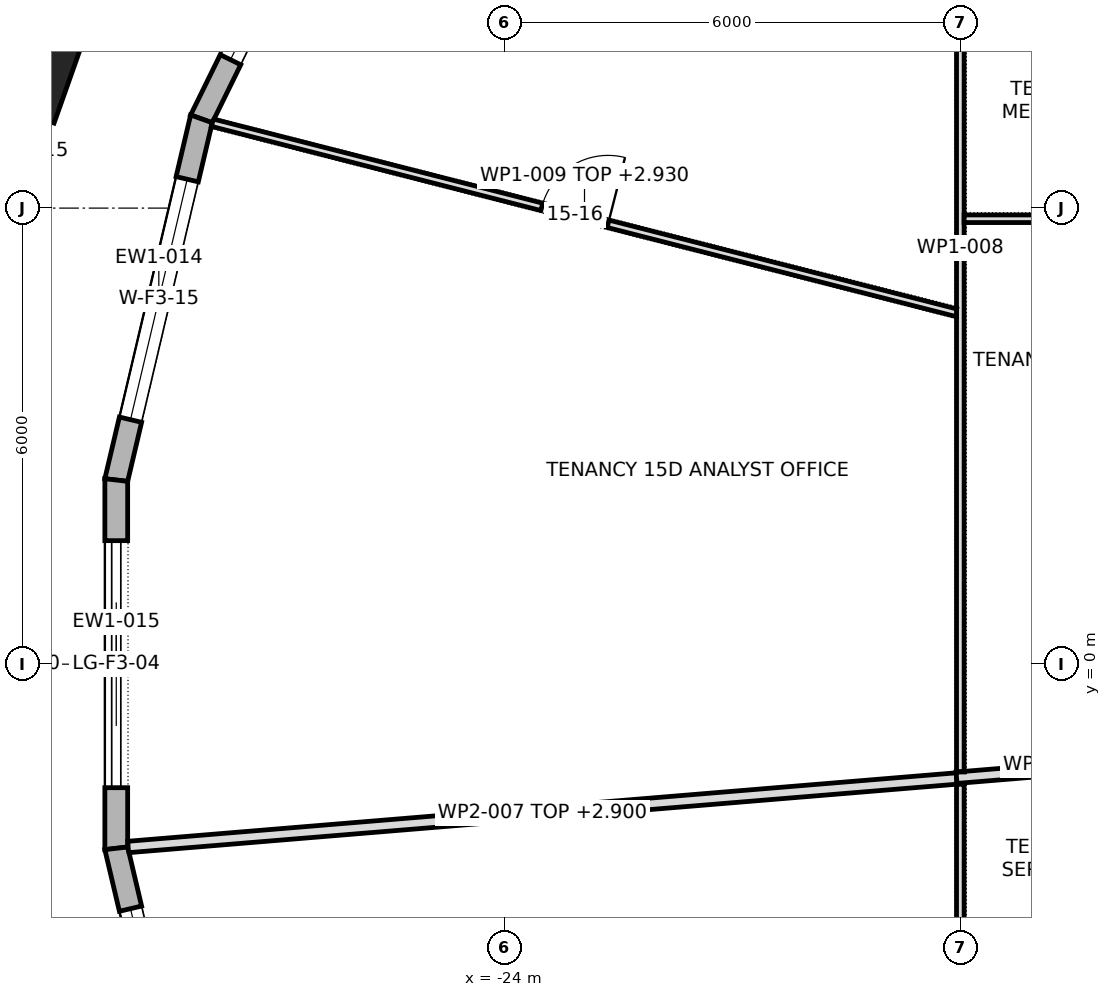
"""IFC4 building model, lengths in metres.
Left out: names, types, materials, properties, quantities, classifications, styles, units other than length and angle.
Written with IfcOpenShell. Run it as: python <this file> out.ifc"""

import sys

from ifc_helpers import new_model, si_unit, direction, frame, frame_2d, origin, origin_2d, place, context, subcontext, project, spatial, polyline, rectangle, outline, extrude, element, fill, save


model = new_model("IFC4")
c1 = context("Model", 3, precision=1e-05, world=origin(), true_north=direction((0.0, 1.0)))
c2 = subcontext(c1, "Body", "Model", "MODEL_VIEW")
j1 = project(units=[si_unit("LENGTHUNIT", "METRE"), si_unit("PLANEANGLEUNIT", "RADIAN")], contexts=[c1])
p1 = place(None, origin())
s1 = spatial("IfcSite", under=j1, at=p1, CompositionType="ELEMENT")
p2 = place(p1, origin())
s2 = spatial("IfcBuilding", under=s1, at=p2, CompositionType="ELEMENT")
p3 = place(p2, frame((0.0, 0.0, 222.9)))
s3 = spatial("IfcBuildingStorey", under=s2, at=p3, CompositionType="ELEMENT", Elevation=222.9)
p4 = place(p3, frame((-30.194, 7.851, 0.0), z_axis=(0.0, 0.0, 1.0), x_axis=(-0.333630814899, -0.942703813162, 0.0)))
e1 = element("IfcColumn", 1, at=p4, inside=s3, PredefinedType="COLUMN", context=c2, shape_type="SweptSolid", body=[
    extrude(rectangle(XDim=1.2, YDim=1.0, at=origin_2d()), origin(), (0.0, 0.0, 1.0), 4.0),
])
p5 = place(p3, frame((-25.787, 11.648, 0.0), z_axis=(0.0, 0.0, 1.0), x_axis=(-0.440795186599, -0.897607711348, 0.0)))
e2 = element("IfcWall", 2, at=p5, inside=s3, PredefinedType="STANDARD", context=c2, shape_type="SweptSolid", body=[
    extrude(outline(polyline([(-0.016, -0.15), (5.001, -0.15), (4.967, 0.15), (0.016, 0.15), (-0.016, -0.15)])), origin(), (0.0, 0.0, 1.0), 3.7),
])
p6 = place(p5, frame((0.867, 0.0, 0.6)))
e3 = element("IfcOpeningElement", 3, at=p6, cuts=e2, PredefinedType="OPENING", context=c2, shape_type="SweptSolid", body=[
    extrude(rectangle(XDim=3.25, YDim=2.65, at=frame_2d((1.625, 1.325))), frame((0.0, 0.162, 0.0), z_axis=(0.0, -1.0, 0.0), x_axis=(1.0, 0.0, 0.0)), (0.0, 0.0, 1.0), 0.324),
])
p7 = place(p3, frame((-27.984, 7.174, 0.0), z_axis=(0.0, 0.0, 1.0), x_axis=(-0.229546618766, -0.97329766763, 0.0)))
e4 = element("IfcWall", 4, at=p7, inside=s3, PredefinedType="STANDARD", context=c2, shape_type="SweptSolid", body=[
    extrude(outline(polyline([(-0.017, -0.15), (4.899, -0.15), (4.865, 0.15), (0.017, 0.15), (-0.017, -0.15)])), origin(), (0.0, 0.0, 1.0), 3.7),
])
p8 = place(p7, frame((0.816, 0.0, 0.6)))
e5 = element("IfcOpeningElement", 5, at=p8, cuts=e4, PredefinedType="OPENING", context=c2, shape_type="SweptSolid", body=[
    extrude(rectangle(XDim=3.25, YDim=2.65, at=frame_2d((1.625, 1.325))), frame((0.0, 0.162, 0.0), z_axis=(0.0, -1.0, 0.0), x_axis=(1.0, 0.0, 0.0)), (0.0, 0.0, 1.0), 0.324),
])
p9 = place(p3, frame((-29.104, 2.423, 0.0), z_axis=(0.0, 0.0, 1.0), x_axis=(0.0, -1.0, 0.0)))
e6 = element("IfcWall", 6, at=p9, inside=s3, PredefinedType="STANDARD", context=c2, shape_type="SweptSolid", body=[
    extrude(outline(polyline([(-0.017, -0.15), (4.863, -0.15), (4.828, 0.15), (0.017, 0.15), (-0.017, -0.15)])), origin(), (0.0, 0.0, 1.0), 3.7),
])
p10 = place(p9, frame((0.798, 0.0, 0.0)))
e7 = element("IfcOpeningElement", 7, at=p10, cuts=e6, PredefinedType="OPENING", context=c2, shape_type="SweptSolid", body=[
    extrude(rectangle(XDim=3.25, YDim=3.25, at=frame_2d((1.625, 1.625))), frame((0.0, 0.162, 0.0), z_axis=(0.0, -1.0, 0.0), x_axis=(1.0, 0.0, 0.0)), (0.0, 0.0, 1.0), 0.324),
])
p11 = place(p3, frame((-29.104, -2.423, 0.0), z_axis=(0.0, 0.0, 1.0), x_axis=(0.229546618766, -0.97329766763, 0.0)))
e8 = element("IfcWall", 8, at=p11, inside=s3, PredefinedType="STANDARD", context=c2, shape_type="SweptSolid", body=[
    extrude(outline(polyline([(-0.017, -0.15), (4.899, -0.15), (4.865, 0.15), (0.017, 0.15), (-0.017, -0.15)])), origin(), (0.0, 0.0, 1.0), 3.7),
])
p12 = place(p11, frame((0.816, 0.0, 0.6)))
e9 = element("IfcOpeningElement", 9, at=p12, cuts=e8, PredefinedType="OPENING", context=c2, shape_type="SweptSolid", body=[
    extrude(rectangle(XDim=3.25, YDim=2.65, at=frame_2d((1.625, 1.325))), frame((0.0, 0.162, 0.0), z_axis=(0.0, -1.0, 0.0), x_axis=(1.0, 0.0, 0.0)), (0.0, 0.0, 1.0), 0.324),
])
p13 = place(p3, frame((-18.0, -12.421, 0.0), z_axis=(0.0, 0.0, 1.0), x_axis=(0.0, 1.0, 0.0)))
e10 = element("IfcWall", 10, at=p13, inside=s3, PredefinedType="PARTITIONING", context=c2, shape_type="SweptSolid", body=[
    extrude(outline(polyline([(0.087, -0.05), (1.77, -0.05), (3.453, -0.05), (5.136, -0.05), (6.819, -0.05), (8.501, -0.05), (8.501, -0.05), (8.601, -0.05), (8.601, -0.05), (10.842, -0.05), (10.842, 0.046), (10.842, 0.05), (9.191, 0.05), (7.541, 0.05), (5.89, 0.05), (4.24, 0.05), (4.235, 0.048), (4.234, 0.05), (2.823, 0.05), (1.411, 0.05), (0.0, 0.05), (0.0, 0.05), (0.011, 0.034), (0.023, 0.043), (0.087, -0.05)])), origin(), (0.0, 0.0, 1.0), 3.7),
])
p14 = place(p13, frame((5.981, 0.0, 0.0)))
e11 = element("IfcOpeningElement", 11, at=p14, cuts=e10, PredefinedType="OPENING", context=c2, shape_type="SweptSolid", body=[
    extrude(rectangle(XDim=0.9, YDim=2.1, at=frame_2d((0.45, 1.05))), frame((0.0, 0.062, 0.0), z_axis=(0.0, -1.0, 0.0), x_axis=(1.0, 0.0, 0.0)), (0.0, 0.0, 1.0), 0.124),
])
p15 = place(p3, frame((-18.049, -1.504, 0.0), z_axis=(0.0, 0.0, 1.0), x_axis=(-0.996601116086, -0.082378488796, 0.0)))
e12 = element("IfcWall", 12, at=p15, inside=s3, PredefinedType="PARTITIONING", context=c2, shape_type="SweptSolid", body=[
    extrude(outline(polyline([(10.936, -0.075), (10.936, 0.044), (10.931, 0.075), (9.11, 0.075), (7.29, 0.075), (5.469, 0.075), (3.648, 0.075), (1.828, 0.075), (0.007, 0.075), (0.007, 0.074), (0.002, 0.075), (0.0, 0.075), (0.0, -0.075), (1.823, -0.075), (3.645, -0.075), (5.468, -0.075), (7.291, -0.075), (9.113, -0.075), (10.936, -0.075)])), origin(), (0.0, 0.0, 1.0), 2.9),
])
p16 = place(p3, frame((-18.0, -1.418, 0.0), z_axis=(0.0, 0.0, 1.0), x_axis=(0.0, 1.0, 0.0)))
e13 = element("IfcWall", 13, at=p16, inside=s3, PredefinedType="PARTITIONING", context=c2, shape_type="SweptSolid", body=[
    extrude(outline(polyline([(0.008, -0.05), (1.813, -0.05), (3.618, -0.05), (5.423, -0.05), (7.229, -0.05), (7.229, -0.05), (7.328, -0.05), (7.328, -0.05), (8.934, -0.05), (10.54, -0.05), (12.146, -0.05), (13.751, -0.05), (13.821, 0.05), (13.821, 0.05), (11.889, 0.05), (9.957, 0.05), (8.025, 0.05), (6.093, 0.05), (6.092, 0.048), (6.085, 0.05), (4.564, 0.05), (3.042, 0.05), (1.521, 0.05), (0.0, 0.05), (0.0, 0.045), (0.008, -0.05)])), origin(), (0.0, 0.0, 1.0), 3.7),
])
p17 = place(p16, frame((10.128, 0.0, 0.0)))
e14 = element("IfcOpeningElement", 14, at=p17, cuts=e13, PredefinedType="OPENING", context=c2, shape_type="SweptSolid", body=[
    extrude(rectangle(XDim=0.9, YDim=2.1, at=frame_2d((0.45, 1.05))), frame((0.0, 0.062, 0.0), z_axis=(0.0, -1.0, 0.0), x_axis=(1.0, 0.0, 0.0)), (0.0, 0.0, 1.0), 0.124),
])
p18 = place(p3, frame((-18.038, 4.62, 0.0), z_axis=(0.0, 0.0, 1.0), x_axis=(-0.96889210833, 0.247483499279, 0.0)))
e15 = element("IfcWall", 15, at=p18, inside=s3, PredefinedType="PARTITIONING", context=c2, shape_type="SweptSolid", body=[
    extrude(outline(polyline([(0.025, -0.05), (1.706, -0.05), (3.386, -0.05), (5.067, -0.05), (6.747, -0.05), (8.427, -0.05), (10.108, -0.05), (10.117, -0.005), (10.117, 0.05), (8.431, 0.05), (6.745, 0.05), (5.059, 0.05), (3.373, 0.05), (1.686, 0.05), (0.0, 0.05), (0.0, 0.049), (0.025, -0.05)])), origin(), (0.0, 0.0, 1.0), 2.93),
])
p19 = place(p18, frame((4.744, 0.0, 0.0)))
e16 = element("IfcOpeningElement", 16, at=p19, cuts=e15, PredefinedType="OPENING", context=c2, shape_type="SweptSolid", body=[
    extrude(rectangle(XDim=0.9, YDim=2.1, at=frame_2d((0.45, 1.05))), frame((0.0, 0.062, 0.0), z_axis=(0.0, -1.0, 0.0), x_axis=(1.0, 0.0, 0.0)), (0.0, 0.0, 1.0), 0.124),
])
p20 = place(p3, frame((-14.069, -1.166, 0.0), z_axis=(0.0, 0.0, 1.0), x_axis=(-0.996614549641, -0.082215810186, 0.0)))
e17 = element("IfcWall", 17, at=p20, inside=s3, PredefinedType="PARTITIONING", context=c2, shape_type="SweptSolid", body=[
    extrude(outline(polyline([(0.0, -0.075), (1.944, -0.075), (3.888, -0.075), (3.888, -0.067), (3.982, -0.075), (3.994, -0.075), (3.994, 0.075), (2.003, 0.075), (0.012, 0.075), (0.0, -0.069), (0.0, -0.075)])), origin(), (0.0, 0.0, 1.0), 2.9),
])
p21 = place(p3, frame((-14.061, 5.86, 0.0), z_axis=(0.0, 0.0, 1.0), x_axis=(-1.0, 0.0, 0.0)))
e18 = element("IfcWall", 18, at=p21, inside=s3, PredefinedType="PARTITIONING", context=c2, shape_type="SweptSolid", body=[
    extrude(outline(polyline([(3.889, 0.05), (1.952, 0.05), (0.014, 0.05), (0.014, 0.0), (0.0, 0.0), (0.0, -0.05), (1.945, -0.05), (3.889, -0.05), (3.889, 0.05)])), origin(), (0.0, 0.0, 1.0), 3.7),
])
p22 = place(p6, origin())
e19 = element("IfcWindow", 19, at=p22, inside=s3, PartitioningType="TRIPLE_PANEL_VERTICAL", PredefinedType="WINDOW", context=c2, shape_type="SweptSolid", body=[
    extrude(rectangle(XDim=3.25, YDim=2.65, at=frame_2d((1.625, 1.325))), frame((0.0, 0.03, 0.0), z_axis=(0.0, -1.0, 0.0), x_axis=(1.0, 0.0, 0.0)), (0.0, 0.0, 1.0), 0.06),
])
fill(e3, e19)
p23 = place(p8, origin())
e20 = element("IfcWindow", 20, at=p23, inside=s3, PartitioningType="TRIPLE_PANEL_VERTICAL", PredefinedType="WINDOW", context=c2, shape_type="SweptSolid", body=[
    extrude(rectangle(XDim=3.25, YDim=2.65, at=frame_2d((1.625, 1.325))), frame((0.0, 0.03, 0.0), z_axis=(0.0, -1.0, 0.0), x_axis=(1.0, 0.0, 0.0)), (0.0, 0.0, 1.0), 0.06),
])
fill(e5, e20)
p24 = place(p10, origin())
e21 = element("IfcDoor", 21, at=p24, inside=s3, OperationType="DOUBLE_DOOR_SLIDING", PredefinedType="DOOR", context=c2, shape_type="SweptSolid", body=[
    extrude(rectangle(XDim=3.25, YDim=3.25, at=frame_2d((1.625, 1.625))), frame((0.0, 0.025, 0.0), z_axis=(0.0, -1.0, 0.0), x_axis=(1.0, 0.0, 0.0)), (0.0, 0.0, 1.0), 0.05),
])
fill(e7, e21)
p25 = place(p12, origin())
e22 = element("IfcWindow", 22, at=p25, inside=s3, PartitioningType="TRIPLE_PANEL_VERTICAL", PredefinedType="WINDOW", context=c2, shape_type="SweptSolid", body=[
    extrude(rectangle(XDim=3.25, YDim=2.65, at=frame_2d((1.625, 1.325))), frame((0.0, 0.03, 0.0), z_axis=(0.0, -1.0, 0.0), x_axis=(1.0, 0.0, 0.0)), (0.0, 0.0, 1.0), 0.06),
])
fill(e9, e22)
p26 = place(p19, frame((0.9, 0.0, 0.0), z_axis=(0.0, 0.0, 1.0), x_axis=(-1.0, 0.0, 0.0)))
e23 = element("IfcDoor", 23, at=p26, inside=s3, OperationType="SINGLE_SWING_LEFT", PredefinedType="DOOR", context=c2, shape_type="SweptSolid", body=[
    extrude(rectangle(XDim=0.9, YDim=2.1, at=frame_2d((0.45, 1.05))), frame((0.0, 0.025, 0.0), z_axis=(0.0, -1.0, 0.0), x_axis=(1.0, 0.0, 0.0)), (0.0, 0.0, 1.0), 0.05),
])
fill(e16, e23)
save(model, sys.argv[1])
